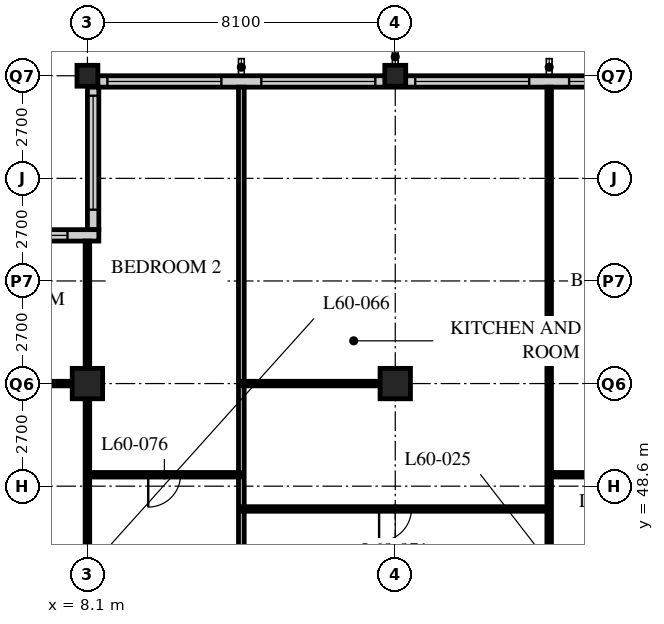
"""IFC4 building model, lengths in metres.
Left out: names, types, materials, properties, quantities, classifications, styles, units other than length and angle.
Written with IfcOpenShell. Run it as: python <this file> out.ifc"""

import sys

from ifc_helpers import new_model, si_unit, direction, frame, frame_2d, origin, origin_2d, place, context, subcontext, project, spatial, rectangle, hollow_rectangle, extrude, element, fill, save


model = new_model("IFC4")
c1 = context("Model", 3, precision=1e-05, world=origin(), true_north=direction((0.0, 1.0)))
c2 = subcontext(c1, "Body", "Model", "MODEL_VIEW")
j1 = project(units=[si_unit("LENGTHUNIT", "METRE"), si_unit("PLANEANGLEUNIT", "RADIAN")], contexts=[c1])
p1 = place(None, origin())
s1 = spatial("IfcSite", under=j1, at=p1, CompositionType="ELEMENT")
p2 = place(p1, origin())
s2 = spatial("IfcBuilding", under=s1, at=p2, CompositionType="ELEMENT")
p3 = place(p2, frame((0.0, 0.0, 231.6)))
s3 = spatial("IfcBuildingStorey", under=s2, at=p3, CompositionType="ELEMENT", Elevation=231.6)
p4 = place(p3, frame((8.1, 51.3, 0.0), z_axis=(0.0, 0.0, 1.0), x_axis=(1.0, 0.0, 0.0)))
e1 = element("IfcColumn", 1, at=p4, inside=s3, PredefinedType="COLUMN", context=c2, shape_type="SweptSolid", body=[
    extrude(hollow_rectangle(XDim=0.8, YDim=0.8, WallThickness=0.08, at=origin_2d()), origin(), (0.0, 0.0, 1.0), 3.6),
])
p5 = place(p3, frame((8.1, 59.4, 0.0), z_axis=(0.0, 0.0, 1.0), x_axis=(1.0, 0.0, 0.0)))
e2 = element("IfcColumn", 2, at=p5, inside=s3, PredefinedType="COLUMN", context=c2, shape_type="SweptSolid", body=[
    extrude(hollow_rectangle(XDim=0.55, YDim=0.55, WallThickness=0.045, at=origin_2d()), origin(), (0.0, 0.0, 1.0), 3.6),
])
p6 = place(p3, frame((16.2, 51.3, 0.0), z_axis=(0.0, 0.0, 1.0), x_axis=(1.0, 0.0, 0.0)))
e3 = element("IfcColumn", 3, at=p6, inside=s3, PredefinedType="COLUMN", context=c2, shape_type="SweptSolid", body=[
    extrude(hollow_rectangle(XDim=0.8, YDim=0.8, WallThickness=0.08, at=origin_2d()), origin(), (0.0, 0.0, 1.0), 3.6),
])
p7 = place(p3, frame((16.2, 59.4, 0.0), z_axis=(0.0, 0.0, 1.0), x_axis=(1.0, 0.0, 0.0)))
e4 = element("IfcColumn", 4, at=p7, inside=s3, PredefinedType="COLUMN", context=c2, shape_type="SweptSolid", body=[
    extrude(hollow_rectangle(XDim=0.55, YDim=0.55, WallThickness=0.045, at=origin_2d()), origin(), (0.0, 0.0, 1.0), 3.6),
])
p8 = place(p3, frame((48.3, 59.25, 0.0), z_axis=(0.0, 0.0, 1.0), x_axis=(-1.0, 0.0, 0.0)))
e5 = element("IfcWall", 5, at=p8, inside=s3, PredefinedType="SOLIDWALL", context=c2, shape_type="SweptSolid", body=[
    extrude(rectangle(XDim=40.2, YDim=0.3, at=frame_2d((20.1, 0.0))), origin(), (0.0, 0.0, 1.0), 2.35),
])
p9 = place(p8, frame((0.225, 0.0, 0.6)))
e6 = element("IfcOpeningElement", 6, at=p9, cuts=e5, PredefinedType="OPENING", context=c2, shape_type="SweptSolid", body=[
    extrude(rectangle(XDim=3.0, YDim=1.7, at=frame_2d((1.5, 0.85))), frame((0.0, 0.16, 0.0), z_axis=(0.0, -1.0, 0.0), x_axis=(1.0, 0.0, 0.0)), (0.0, 0.0, 1.0), 0.32),
])
p10 = place(p8, frame((4.275, 0.0, 0.6)))
e7 = element("IfcOpeningElement", 7, at=p10, cuts=e5, PredefinedType="OPENING", context=c2, shape_type="SweptSolid", body=[
    extrude(rectangle(XDim=3.0, YDim=1.7, at=frame_2d((1.5, 0.85))), frame((0.0, 0.16, 0.0), z_axis=(0.0, -1.0, 0.0), x_axis=(1.0, 0.0, 0.0)), (0.0, 0.0, 1.0), 0.32),
])
p11 = place(p8, frame((8.325, 0.0, 0.6)))
e8 = element("IfcOpeningElement", 8, at=p11, cuts=e5, PredefinedType="OPENING", context=c2, shape_type="SweptSolid", body=[
    extrude(rectangle(XDim=3.0, YDim=1.7, at=frame_2d((1.5, 0.85))), frame((0.0, 0.16, 0.0), z_axis=(0.0, -1.0, 0.0), x_axis=(1.0, 0.0, 0.0)), (0.0, 0.0, 1.0), 0.32),
])
p12 = place(p8, frame((12.375, 0.0, 0.6)))
e9 = element("IfcOpeningElement", 9, at=p12, cuts=e5, PredefinedType="OPENING", context=c2, shape_type="SweptSolid", body=[
    extrude(rectangle(XDim=3.0, YDim=1.7, at=frame_2d((1.5, 0.85))), frame((0.0, 0.16, 0.0), z_axis=(0.0, -1.0, 0.0), x_axis=(1.0, 0.0, 0.0)), (0.0, 0.0, 1.0), 0.32),
])
p13 = place(p8, frame((16.425, 0.0, 0.6)))
e10 = element("IfcOpeningElement", 10, at=p13, cuts=e5, PredefinedType="OPENING", context=c2, shape_type="SweptSolid", body=[
    extrude(rectangle(XDim=3.0, YDim=1.7, at=frame_2d((1.5, 0.85))), frame((0.0, 0.16, 0.0), z_axis=(0.0, -1.0, 0.0), x_axis=(1.0, 0.0, 0.0)), (0.0, 0.0, 1.0), 0.32),
])
p14 = place(p8, frame((20.475, 0.0, 0.6)))
e11 = element("IfcOpeningElement", 11, at=p14, cuts=e5, PredefinedType="OPENING", context=c2, shape_type="SweptSolid", body=[
    extrude(rectangle(XDim=3.0, YDim=1.7, at=frame_2d((1.5, 0.85))), frame((0.0, 0.16, 0.0), z_axis=(0.0, -1.0, 0.0), x_axis=(1.0, 0.0, 0.0)), (0.0, 0.0, 1.0), 0.32),
])
p15 = place(p8, frame((24.525, 0.0, 0.6)))
e12 = element("IfcOpeningElement", 12, at=p15, cuts=e5, PredefinedType="OPENING", context=c2, shape_type="SweptSolid", body=[
    extrude(rectangle(XDim=3.0, YDim=1.7, at=frame_2d((1.5, 0.85))), frame((0.0, 0.16, 0.0), z_axis=(0.0, -1.0, 0.0), x_axis=(1.0, 0.0, 0.0)), (0.0, 0.0, 1.0), 0.32),
])
p16 = place(p8, frame((28.575, 0.0, 0.6)))
e13 = element("IfcOpeningElement", 13, at=p16, cuts=e5, PredefinedType="OPENING", context=c2, shape_type="SweptSolid", body=[
    extrude(rectangle(XDim=3.0, YDim=1.7, at=frame_2d((1.5, 0.85))), frame((0.0, 0.16, 0.0), z_axis=(0.0, -1.0, 0.0), x_axis=(1.0, 0.0, 0.0)), (0.0, 0.0, 1.0), 0.32),
])
p17 = place(p8, frame((32.625, 0.0, 0.6)))
e14 = element("IfcOpeningElement", 14, at=p17, cuts=e5, PredefinedType="OPENING", context=c2, shape_type="SweptSolid", body=[
    extrude(rectangle(XDim=3.0, YDim=1.7, at=frame_2d((1.5, 0.85))), frame((0.0, 0.16, 0.0), z_axis=(0.0, -1.0, 0.0), x_axis=(1.0, 0.0, 0.0)), (0.0, 0.0, 1.0), 0.32),
])
p18 = place(p8, frame((36.675, 0.0, 0.6)))
e15 = element("IfcOpeningElement", 15, at=p18, cuts=e5, PredefinedType="OPENING", context=c2, shape_type="SweptSolid", body=[
    extrude(rectangle(XDim=3.0, YDim=1.7, at=frame_2d((1.5, 0.85))), frame((0.0, 0.16, 0.0), z_axis=(0.0, -1.0, 0.0), x_axis=(1.0, 0.0, 0.0)), (0.0, 0.0, 1.0), 0.32),
])
p19 = place(p3, frame((8.25, 59.1, 0.0), z_axis=(0.0, 0.0, 1.0), x_axis=(0.0, -1.0, 0.0)))
e16 = element("IfcWall", 16, at=p19, inside=s3, PredefinedType="SOLIDWALL", context=c2, shape_type="SweptSolid", body=[
    extrude(rectangle(XDim=3.75, YDim=0.3, at=frame_2d((1.875, 0.0))), origin(), (0.0, 0.0, 1.0), 2.35),
])
p20 = place(p19, frame((0.225, 0.0, 0.6)))
e17 = element("IfcOpeningElement", 17, at=p20, cuts=e16, PredefinedType="OPENING", context=c2, shape_type="SweptSolid", body=[
    extrude(rectangle(XDim=3.0, YDim=1.7, at=frame_2d((1.5, 0.85))), frame((0.0, 0.16, 0.0), z_axis=(0.0, -1.0, 0.0), x_axis=(1.0, 0.0, 0.0)), (0.0, 0.0, 1.0), 0.32),
])
p21 = place(p3, frame((8.4, 55.2, 0.0), z_axis=(0.0, 0.0, 1.0), x_axis=(-1.0, 0.0, 0.0)))
e18 = element("IfcWall", 18, at=p21, inside=s3, PredefinedType="SOLIDWALL", context=c2, shape_type="SweptSolid", body=[
    extrude(rectangle(XDim=4.35, YDim=0.3, at=frame_2d((2.175, 0.0))), origin(), (0.0, 0.0, 1.0), 2.65),
])
p22 = place(p21, frame((0.825, 0.0, 0.6)))
e19 = element("IfcOpeningElement", 19, at=p22, cuts=e18, PredefinedType="OPENING", context=c2, shape_type="SweptSolid", body=[
    extrude(rectangle(XDim=3.0, YDim=1.7, at=frame_2d((1.5, 0.85))), frame((0.0, 0.16, 0.0), z_axis=(0.0, -1.0, 0.0), x_axis=(1.0, 0.0, 0.0)), (0.0, 0.0, 1.0), 0.32),
])
p23 = place(p3, frame((20.25, 45.6, 0.0), z_axis=(0.0, 0.0, 1.0), x_axis=(0.0, 1.0, 0.0)))
e20 = element("IfcWall", 20, at=p23, inside=s3, PredefinedType="PARTITIONING", context=c2, shape_type="SweptSolid", body=[
    extrude(rectangle(XDim=13.5, YDim=0.12, at=frame_2d((6.75, 0.0))), origin(), (0.0, 0.0, 1.0), 3.35),
])
p24 = place(p3, frame((8.1, 45.6, 0.0), z_axis=(0.0, 0.0, 1.0), x_axis=(0.0, 1.0, 0.0)))
e21 = element("IfcWall", 21, at=p24, inside=s3, PredefinedType="PARTITIONING", context=c2, shape_type="SweptSolid", body=[
    extrude(rectangle(XDim=9.45, YDim=0.12, at=frame_2d((4.725, 0.0))), origin(), (0.0, 0.0, 1.0), 2.35),
])
p25 = place(p3, frame((8.1, 51.3, 0.0), z_axis=(0.0, 0.0, 1.0), x_axis=(-1.0, 0.0, 0.0)))
e22 = element("IfcWall", 22, at=p25, inside=s3, PredefinedType="PARTITIONING", context=c2, shape_type="SweptSolid", body=[
    extrude(rectangle(XDim=3.75, YDim=0.12, at=frame_2d((1.875, 0.0))), origin(), (0.0, 0.0, 1.0), 2.588),
])
p26 = place(p25, frame((1.875, 0.0, 0.0)))
e23 = element("IfcOpeningElement", 23, at=p26, cuts=e22, PredefinedType="OPENING", context=c2, shape_type="SweptSolid", body=[
    extrude(rectangle(XDim=0.85, YDim=2.1, at=frame_2d((0.425, 1.05))), frame((0.0, 0.07, 0.0), z_axis=(0.0, -1.0, 0.0), x_axis=(1.0, 0.0, 0.0)), (0.0, 0.0, 1.0), 0.14),
])
p27 = place(p3, frame((12.15, 43.2, 0.0), z_axis=(0.0, 0.0, 1.0), x_axis=(0.0, 1.0, 0.0)))
e24 = element("IfcWall", 24, at=p27, inside=s3, PredefinedType="PARTITIONING", context=c2, shape_type="SweptSolid", body=[
    extrude(rectangle(XDim=15.9, YDim=0.15, at=frame_2d((7.95, 0.0))), origin(), (0.0, 0.0, 1.0), 3.35),
])
p28 = place(p3, frame((12.15, 48.0, 0.0), z_axis=(0.0, 0.0, 1.0), x_axis=(1.0, 0.0, 0.0)))
e25 = element("IfcWall", 25, at=p28, inside=s3, PredefinedType="PARTITIONING", context=c2, shape_type="SweptSolid", body=[
    extrude(rectangle(XDim=8.1, YDim=0.12, at=frame_2d((4.05, 0.0))), origin(), (0.0, 0.0, 1.0), 3.35),
])
p29 = place(p28, frame((3.625, 0.0, 0.0)))
e26 = element("IfcOpeningElement", 26, at=p29, cuts=e25, PredefinedType="OPENING", context=c2, shape_type="SweptSolid", body=[
    extrude(rectangle(XDim=0.85, YDim=2.1, at=frame_2d((0.425, 1.05))), frame((0.0, 0.07, 0.0), z_axis=(0.0, -1.0, 0.0), x_axis=(1.0, 0.0, 0.0)), (0.0, 0.0, 1.0), 0.14),
])
p30 = place(p3, frame((20.25, 48.9, 0.0), z_axis=(0.0, 0.0, 1.0), x_axis=(1.0, 0.0, 0.0)))
e27 = element("IfcWall", 27, at=p30, inside=s3, PredefinedType="PARTITIONING", context=c2, shape_type="SweptSolid", body=[
    extrude(rectangle(XDim=4.05, YDim=0.12, at=frame_2d((2.025, 0.0))), origin(), (0.0, 0.0, 1.0), 3.35),
])
p31 = place(p30, frame((1.6, 0.0, 0.0)))
e28 = element("IfcOpeningElement", 28, at=p31, cuts=e27, PredefinedType="OPENING", context=c2, shape_type="SweptSolid", body=[
    extrude(rectangle(XDim=0.85, YDim=2.1, at=frame_2d((0.425, 1.05))), frame((0.0, 0.07, 0.0), z_axis=(0.0, -1.0, 0.0), x_axis=(1.0, 0.0, 0.0)), (0.0, 0.0, 1.0), 0.14),
])
p32 = place(p3, frame((8.1, 48.9, 0.0), z_axis=(0.0, 0.0, 1.0), x_axis=(1.0, 0.0, 0.0)))
e29 = element("IfcWall", 29, at=p32, inside=s3, PredefinedType="PARTITIONING", context=c2, shape_type="SweptSolid", body=[
    extrude(rectangle(XDim=4.05, YDim=0.12, at=frame_2d((2.025, 0.0))), origin(), (0.0, 0.0, 1.0), 3.35),
])
p33 = place(p32, frame((1.6, 0.0, 0.0)))
e30 = element("IfcOpeningElement", 30, at=p33, cuts=e29, PredefinedType="OPENING", context=c2, shape_type="SweptSolid", body=[
    extrude(rectangle(XDim=0.85, YDim=2.1, at=frame_2d((0.425, 1.05))), frame((0.0, 0.07, 0.0), z_axis=(0.0, -1.0, 0.0), x_axis=(1.0, 0.0, 0.0)), (0.0, 0.0, 1.0), 0.14),
])
p34 = place(p3, frame((12.15, 51.3, 0.0), z_axis=(0.0, 0.0, 1.0), x_axis=(1.0, 0.0, 0.0)))
e31 = element("IfcWall", 31, at=p34, inside=s3, PredefinedType="PARTITIONING", context=c2, shape_type="SweptSolid", body=[
    extrude(rectangle(XDim=3.65, YDim=0.12, at=frame_2d((1.825, 0.0))), origin(), (0.0, 0.0, 1.0), 2.588),
])
p35 = place(p15, origin())
e32 = element("IfcWindow", 32, at=p35, inside=s3, PartitioningType="SINGLE_PANEL", PredefinedType="WINDOW", context=c2, shape_type="SweptSolid", body=[
    extrude(rectangle(XDim=3.0, YDim=1.7, at=frame_2d((1.5, 0.85))), frame((0.0, 0.03, 0.0), z_axis=(0.0, -1.0, 0.0), x_axis=(1.0, 0.0, 0.0)), (0.0, 0.0, 1.0), 0.06),
])
fill(e12, e32)
p36 = place(p16, origin())
e33 = element("IfcWindow", 33, at=p36, inside=s3, PartitioningType="SINGLE_PANEL", PredefinedType="WINDOW", context=c2, shape_type="SweptSolid", body=[
    extrude(rectangle(XDim=3.0, YDim=1.7, at=frame_2d((1.5, 0.85))), frame((0.0, 0.03, 0.0), z_axis=(0.0, -1.0, 0.0), x_axis=(1.0, 0.0, 0.0)), (0.0, 0.0, 1.0), 0.06),
])
fill(e13, e33)
p37 = place(p17, origin())
e34 = element("IfcWindow", 34, at=p37, inside=s3, PartitioningType="SINGLE_PANEL", PredefinedType="WINDOW", context=c2, shape_type="SweptSolid", body=[
    extrude(rectangle(XDim=3.0, YDim=1.7, at=frame_2d((1.5, 0.85))), frame((0.0, 0.03, 0.0), z_axis=(0.0, -1.0, 0.0), x_axis=(1.0, 0.0, 0.0)), (0.0, 0.0, 1.0), 0.06),
])
fill(e14, e34)
p38 = place(p18, origin())
e35 = element("IfcWindow", 35, at=p38, inside=s3, PartitioningType="SINGLE_PANEL", PredefinedType="WINDOW", context=c2, shape_type="SweptSolid", body=[
    extrude(rectangle(XDim=3.0, YDim=1.7, at=frame_2d((1.5, 0.85))), frame((0.0, 0.03, 0.0), z_axis=(0.0, -1.0, 0.0), x_axis=(1.0, 0.0, 0.0)), (0.0, 0.0, 1.0), 0.06),
])
fill(e15, e35)
p39 = place(p20, origin())
e36 = element("IfcWindow", 36, at=p39, inside=s3, PartitioningType="SINGLE_PANEL", PredefinedType="WINDOW", context=c2, shape_type="SweptSolid", body=[
    extrude(rectangle(XDim=3.0, YDim=1.7, at=frame_2d((1.5, 0.85))), frame((0.0, 0.03, 0.0), z_axis=(0.0, -1.0, 0.0), x_axis=(1.0, 0.0, 0.0)), (0.0, 0.0, 1.0), 0.06),
])
fill(e17, e36)
p40 = place(p22, origin())
e37 = element("IfcWindow", 37, at=p40, inside=s3, PartitioningType="SINGLE_PANEL", PredefinedType="WINDOW", context=c2, shape_type="SweptSolid", body=[
    extrude(rectangle(XDim=3.0, YDim=1.7, at=frame_2d((1.5, 0.85))), frame((0.0, 0.03, 0.0), z_axis=(0.0, -1.0, 0.0), x_axis=(1.0, 0.0, 0.0)), (0.0, 0.0, 1.0), 0.06),
])
fill(e19, e37)
p41 = place(p29, origin())
e38 = element("IfcDoor", 38, at=p41, inside=s3, OperationType="SINGLE_SWING_RIGHT", PredefinedType="DOOR", context=c2, shape_type="SweptSolid", body=[
    extrude(rectangle(XDim=0.85, YDim=2.1, at=frame_2d((0.425, 1.05))), frame((0.0, 0.025, 0.0), z_axis=(0.0, -1.0, 0.0), x_axis=(1.0, 0.0, 0.0)), (0.0, 0.0, 1.0), 0.05),
])
fill(e26, e38)
p42 = place(p33, origin())
e39 = element("IfcDoor", 39, at=p42, inside=s3, OperationType="SINGLE_SWING_RIGHT", PredefinedType="DOOR", context=c2, shape_type="SweptSolid", body=[
    extrude(rectangle(XDim=0.85, YDim=2.1, at=frame_2d((0.425, 1.05))), frame((0.0, 0.025, 0.0), z_axis=(0.0, -1.0, 0.0), x_axis=(1.0, 0.0, 0.0)), (0.0, 0.0, 1.0), 0.05),
])
fill(e30, e39)
save(model, sys.argv[1])
